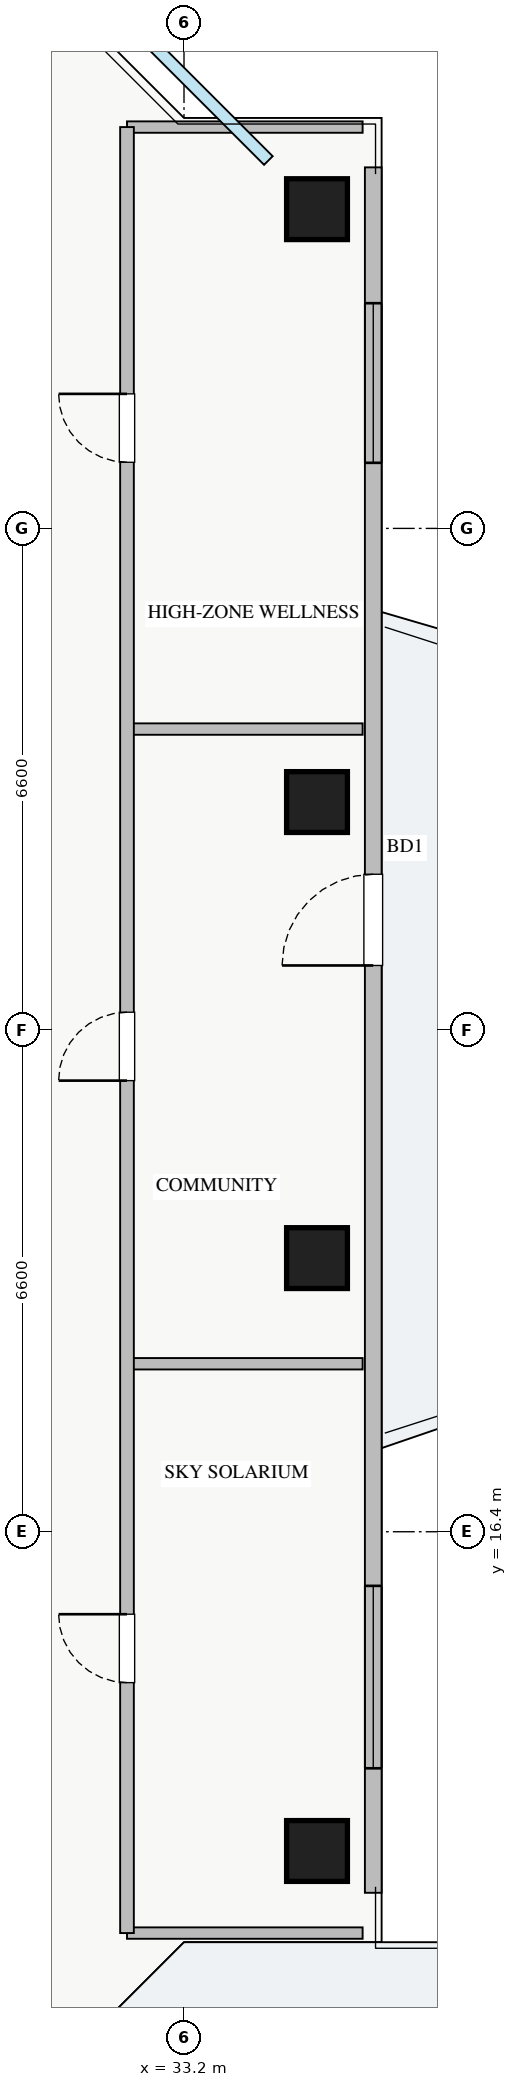
"""IFC4 building model, lengths in metres.
Left out: names, types, materials, properties, quantities, classifications, styles, units other than length and angle.
Written with IfcOpenShell. Run it as: python <this file> out.ifc"""

import sys

from ifc_helpers import new_model, si_unit, direction, frame, frame_2d, origin, origin_2d, place, context, subcontext, project, spatial, rectangle, extrude, source, transform, mapped, element, fill, save


model = new_model("IFC4")
c1 = context("Model", 3, precision=1e-05, world=origin(), true_north=direction((0.0, 1.0)))
c2 = subcontext(c1, "Body", "Model", "MODEL_VIEW")
j1 = project(units=[si_unit("LENGTHUNIT", "METRE"), si_unit("PLANEANGLEUNIT", "RADIAN")], contexts=[c1])
p1 = place(None, origin())
s1 = spatial("IfcSite", under=j1, at=p1, CompositionType="ELEMENT")
p2 = place(p1, origin())
s2 = spatial("IfcBuilding", under=s1, at=p2, CompositionType="ELEMENT")
p3 = place(p2, frame((0.0, 0.0, 203.5)))
s3 = spatial("IfcBuildingStorey", under=s2, at=p3, CompositionType="ELEMENT", Elevation=203.5)
m1 = source(origin(), c2, "Body", "SweptSolid", [
    extrude(rectangle(XDim=0.8, YDim=0.8, at=origin_2d()), origin(), (0.0, 0.0, 1.0), 3.25),
])
for number, where, z_axis, x_axis in (
    (1, (34.95, 12.2, 0.0), (0.0, 0.0, 1.0), (1.0, 0.0, 0.0)),
    (2, (34.95, 20.0, 0.0), (0.0, 0.0, 1.0), (1.0, 0.0, 0.0)),
    (3, (34.95, 26.0, 0.0), (0.0, 0.0, 1.0), (1.0, 0.0, 0.0)),
    (4, (34.95, 33.8, 0.0), (0.0, 0.0, 1.0), (1.0, 0.0, 0.0)),
):
    element("IfcColumn", number, at=place(p3, frame(where, z_axis=z_axis, x_axis=x_axis)), inside=s3, PredefinedType="COLUMN", context=c2, shape_type="MappedRepresentation", body=[
        mapped(m1, transform((0.0, 0.0, 0.0), x_axis=(1.0, 0.0, 0.0), y_axis=(0.0, 1.0, 0.0), z_axis=(0.0, 0.0, 1.0), scale=1.0)),
    ])
p4 = place(p3, frame((35.69, 11.65, 0.0), z_axis=(0.0, 0.0, 1.0), x_axis=(0.0, 1.0, 0.0)))
e5 = element("IfcWall", 5, at=p4, inside=s3, PredefinedType="STANDARD", context=c2, shape_type="SweptSolid", body=[
    extrude(rectangle(XDim=22.7, YDim=0.22, at=frame_2d((11.35, 0.0))), origin(), (0.0, 0.0, 1.0), 2.61),
])
p5 = place(p4, frame((12.2, 0.0, 0.0)))
e6 = element("IfcOpeningElement", 6, at=p5, cuts=e5, PredefinedType="OPENING", context=c2, shape_type="SweptSolid", body=[
    extrude(rectangle(XDim=1.2, YDim=2.1, at=frame_2d((0.6, 1.05))), frame((0.0, 0.12, 0.0), z_axis=(0.0, -1.0, 0.0), x_axis=(1.0, 0.0, 0.0)), (0.0, 0.0, 1.0), 0.24),
])
p6 = place(p4, frame((1.638, 0.0, 0.9)))
e7 = element("IfcOpeningElement", 7, at=p6, cuts=e5, PredefinedType="OPENING", context=c2, shape_type="SweptSolid", body=[
    extrude(rectangle(XDim=2.4, YDim=1.48, at=frame_2d((1.2, 0.74))), frame((0.0, 0.12, 0.0), z_axis=(0.0, -1.0, 0.0), x_axis=(1.0, 0.0, 0.0)), (0.0, 0.0, 1.0), 0.24),
])
p7 = place(p4, frame((18.813, 0.0, 0.9)))
e8 = element("IfcOpeningElement", 8, at=p7, cuts=e5, PredefinedType="OPENING", context=c2, shape_type="SweptSolid", body=[
    extrude(rectangle(XDim=2.1, YDim=1.48, at=frame_2d((1.05, 0.74))), frame((0.0, 0.12, 0.0), z_axis=(0.0, -1.0, 0.0), x_axis=(1.0, 0.0, 0.0)), (0.0, 0.0, 1.0), 0.24),
])
for number, where, z_axis, x_axis in (
    (9, (32.45, 34.88, 0.0), (0.0, 0.0, 1.0), (1.0, 0.0, 0.0)),
    (10, (32.45, 11.12, 0.0), (0.0, 0.0, 1.0), (1.0, 0.0, 0.0)),
    (11, (32.45, 18.61, 0.0), (0.0, 0.0, 1.0), (1.0, 0.0, 0.0)),
    (12, (32.45, 26.96, 0.0), (0.0, 0.0, 1.0), (1.0, 0.0, 0.0)),
):
    element("IfcWall", number, at=place(p3, frame(where, z_axis=z_axis, x_axis=x_axis)), inside=s3, PredefinedType="PARTITIONING", context=c2, shape_type="SweptSolid", body=[
        extrude(rectangle(XDim=3.1, YDim=0.15, at=frame_2d((1.55, 0.0))), origin(), (0.0, 0.0, 1.0), 3.07),
    ])
p8 = place(p3, frame((32.45, 11.12, 0.0), z_axis=(0.0, 0.0, 1.0), x_axis=(0.0, 1.0, 0.0)))
e13 = element("IfcWall", 13, at=p8, inside=s3, PredefinedType="PARTITIONING", context=c2, shape_type="SweptSolid", body=[
    extrude(rectangle(XDim=23.76, YDim=0.18, at=frame_2d((11.88, 0.0))), origin(), (0.0, 0.0, 1.0), 3.07),
])
p9 = place(p8, frame((3.295, 0.0, 0.0)))
e14 = element("IfcOpeningElement", 14, at=p9, cuts=e13, PredefinedType="OPENING", context=c2, shape_type="SweptSolid", body=[
    extrude(rectangle(XDim=0.9, YDim=2.05, at=frame_2d((0.45, 1.025))), frame((0.0, 0.1, 0.0), z_axis=(0.0, -1.0, 0.0), x_axis=(1.0, 0.0, 0.0)), (0.0, 0.0, 1.0), 0.2),
])
p10 = place(p8, frame((11.215, 0.0, 0.0)))
e15 = element("IfcOpeningElement", 15, at=p10, cuts=e13, PredefinedType="OPENING", context=c2, shape_type="SweptSolid", body=[
    extrude(rectangle(XDim=0.9, YDim=2.05, at=frame_2d((0.45, 1.025))), frame((0.0, 0.1, 0.0), z_axis=(0.0, -1.0, 0.0), x_axis=(1.0, 0.0, 0.0)), (0.0, 0.0, 1.0), 0.2),
])
p11 = place(p8, frame((19.35, 0.0, 0.0)))
e16 = element("IfcOpeningElement", 16, at=p11, cuts=e13, PredefinedType="OPENING", context=c2, shape_type="SweptSolid", body=[
    extrude(rectangle(XDim=0.9, YDim=2.05, at=frame_2d((0.45, 1.025))), frame((0.0, 0.1, 0.0), z_axis=(0.0, -1.0, 0.0), x_axis=(1.0, 0.0, 0.0)), (0.0, 0.0, 1.0), 0.2),
])
m2 = source(origin(), c2, "Body", "SweptSolid", [
    extrude(rectangle(XDim=1.2, YDim=2.1, at=frame_2d((0.6, 1.05))), frame((0.0, 0.025, 0.0), z_axis=(0.0, -1.0, 0.0), x_axis=(1.0, 0.0, 0.0)), (0.0, 0.0, 1.0), 0.05),
])
p12 = place(p5, origin())
e17 = element("IfcDoor", 17, at=p12, inside=s3, OperationType="SINGLE_SWING_LEFT", PredefinedType="DOOR", context=c2, shape_type="MappedRepresentation", body=[
    mapped(m2, transform((0.0, 0.0, 0.0), x_axis=(1.0, 0.0, 0.0), y_axis=(0.0, 1.0, 0.0), z_axis=(0.0, 0.0, 1.0), scale=1.0)),
])
fill(e6, e17)
m3 = source(origin(), c2, "Body", "SweptSolid", [
    extrude(rectangle(XDim=2.4, YDim=1.48, at=frame_2d((1.2, 0.74))), frame((0.0, 0.03, 0.0), z_axis=(0.0, -1.0, 0.0), x_axis=(1.0, 0.0, 0.0)), (0.0, 0.0, 1.0), 0.06),
])
p13 = place(p6, origin())
e18 = element("IfcWindow", 18, at=p13, inside=s3, PartitioningType="TRIPLE_PANEL_VERTICAL", PredefinedType="WINDOW", context=c2, shape_type="MappedRepresentation", body=[
    mapped(m3, transform((0.0, 0.0, 0.0), x_axis=(1.0, 0.0, 0.0), y_axis=(0.0, 1.0, 0.0), z_axis=(0.0, 0.0, 1.0), scale=1.0)),
])
fill(e7, e18)
m4 = source(origin(), c2, "Body", "SweptSolid", [
    extrude(rectangle(XDim=2.1, YDim=1.48, at=frame_2d((1.05, 0.74))), frame((0.0, 0.03, 0.0), z_axis=(0.0, -1.0, 0.0), x_axis=(1.0, 0.0, 0.0)), (0.0, 0.0, 1.0), 0.06),
])
p14 = place(p7, origin())
e19 = element("IfcWindow", 19, at=p14, inside=s3, PartitioningType="TRIPLE_PANEL_VERTICAL", PredefinedType="WINDOW", context=c2, shape_type="MappedRepresentation", body=[
    mapped(m4, transform((0.0, 0.0, 0.0), x_axis=(1.0, 0.0, 0.0), y_axis=(0.0, 1.0, 0.0), z_axis=(0.0, 0.0, 1.0), scale=1.0)),
])
fill(e8, e19)
m5 = source(origin(), c2, "Body", "SweptSolid", [
    extrude(rectangle(XDim=0.9, YDim=2.05, at=frame_2d((0.45, 1.025))), frame((0.0, 0.025, 0.0), z_axis=(0.0, -1.0, 0.0), x_axis=(1.0, 0.0, 0.0)), (0.0, 0.0, 1.0), 0.05),
])
p15 = place(p9, origin())
e20 = element("IfcDoor", 20, at=p15, inside=s3, OperationType="SINGLE_SWING_RIGHT", PredefinedType="DOOR", context=c2, shape_type="MappedRepresentation", body=[
    mapped(m5, transform((0.0, 0.0, 0.0), x_axis=(1.0, 0.0, 0.0), y_axis=(0.0, 1.0, 0.0), z_axis=(0.0, 0.0, 1.0), scale=1.0)),
])
fill(e14, e20)
p16 = place(p10, origin())
e21 = element("IfcDoor", 21, at=p16, inside=s3, OperationType="SINGLE_SWING_LEFT", PredefinedType="DOOR", context=c2, shape_type="MappedRepresentation", body=[
    mapped(m5, transform((0.0, 0.0, 0.0), x_axis=(1.0, 0.0, 0.0), y_axis=(0.0, 1.0, 0.0), z_axis=(0.0, 0.0, 1.0), scale=1.0)),
])
fill(e15, e21)
p17 = place(p11, origin())
e22 = element("IfcDoor", 22, at=p17, inside=s3, OperationType="SINGLE_SWING_RIGHT", PredefinedType="DOOR", context=c2, shape_type="MappedRepresentation", body=[
    mapped(m5, transform((0.0, 0.0, 0.0), x_axis=(1.0, 0.0, 0.0), y_axis=(0.0, 1.0, 0.0), z_axis=(0.0, 0.0, 1.0), scale=1.0)),
])
fill(e16, e22)
save(model, sys.argv[1])
